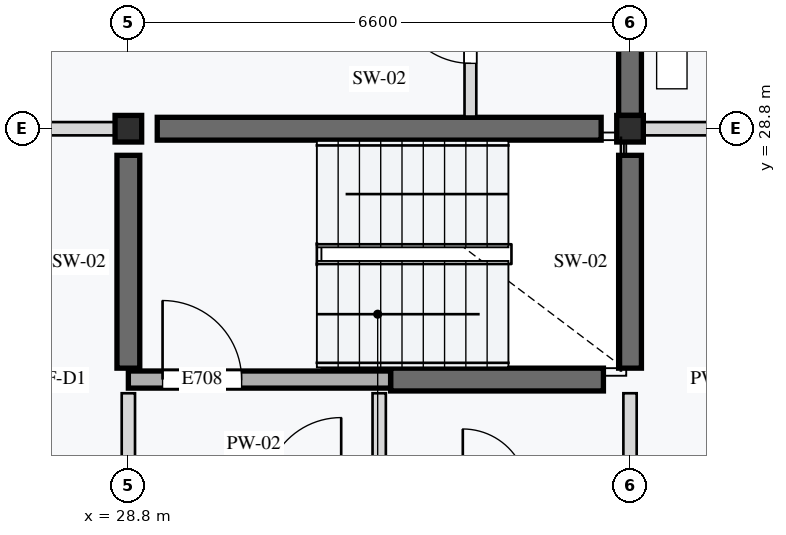
"""IFC4 building model, lengths in metres.
Left out: names, types, materials, properties, quantities, classifications, styles, units other than length and angle.
Written with IfcOpenShell. Run it as: python <this file> out.ifc"""

import sys

from ifc_helpers import new_model, si_unit, direction, frame, frame_2d, origin, origin_2d, place, context, subcontext, project, spatial, rectangle, extrude, element, fill, save


model = new_model("IFC4")
c1 = context("Model", 3, precision=1e-05, world=origin(), true_north=direction((0.0, 1.0)))
c2 = subcontext(c1, "Body", "Model", "MODEL_VIEW")
j1 = project(units=[si_unit("LENGTHUNIT", "METRE"), si_unit("PLANEANGLEUNIT", "RADIAN")], contexts=[c1])
p1 = place(None, origin())
s1 = spatial("IfcSite", under=j1, at=p1, CompositionType="ELEMENT")
p2 = place(p1, origin())
s2 = spatial("IfcBuilding", under=s1, at=p2, CompositionType="ELEMENT")
p3 = place(p2, frame((0.0, 0.0, 24.4)))
s3 = spatial("IfcBuildingStorey", under=s2, at=p3, CompositionType="ELEMENT", Elevation=24.4)
for number, where, z_axis, x_axis in (
    (1, (28.8, 28.8, 0.0), (0.0, 0.0, 1.0), (1.0, 0.0, 0.0)),
    (2, (35.4, 28.8, 0.0), (0.0, 0.0, 1.0), (1.0, 0.0, 0.0)),
):
    element("IfcColumn", number, at=place(p3, frame(where, z_axis=z_axis, x_axis=x_axis)), inside=s3, PredefinedType="COLUMN", context=c2, shape_type="SweptSolid", body=[
        extrude(rectangle(XDim=0.35, YDim=0.35, at=origin_2d()), origin(), (0.0, 0.0, 1.0), 3.2),
    ])
p4 = place(p3, frame((29.18, 28.8, 0.0), z_axis=(0.0, 0.0, 1.0), x_axis=(1.0, 0.0, 0.0)))
e3 = element("IfcWall", 3, at=p4, inside=s3, PredefinedType="SHEAR", context=c2, shape_type="SweptSolid", body=[
    extrude(rectangle(XDim=5.84, YDim=0.3, at=frame_2d((2.92, 0.0))), origin(), (0.0, 0.0, 1.0), 2.97),
])
for number, where, z_axis, x_axis in (
    (4, (32.25, 25.5, 0.0), (0.0, 0.0, 1.0), (1.0, 0.0, 0.0)),
    (5, (28.8, 25.65, 0.0), (0.0, 0.0, 1.0), (0.0, 1.0, 0.0)),
    (6, (35.4, 25.65, 0.0), (0.0, 0.0, 1.0), (0.0, 1.0, 0.0)),
):
    element("IfcWall", number, at=place(p3, frame(where, z_axis=z_axis, x_axis=x_axis)), inside=s3, PredefinedType="SHEAR", context=c2, shape_type="SweptSolid", body=[
        extrude(rectangle(XDim=2.8, YDim=0.3, at=frame_2d((1.4, 0.0))), origin(), (0.0, 0.0, 1.0), 2.97),
    ])
p5 = place(p3, frame((35.4, 28.975, 0.0), z_axis=(0.0, 0.0, 1.0), x_axis=(0.0, 1.0, 0.0)))
e7 = element("IfcWall", 7, at=p5, inside=s3, PredefinedType="SHEAR", context=c2, shape_type="SweptSolid", body=[
    extrude(rectangle(XDim=6.25, YDim=0.3, at=frame_2d((3.125, 0.0))), origin(), (0.0, 0.0, 1.0), 2.97),
])
p6 = place(p3, frame((28.8, 25.5, 0.0), z_axis=(0.0, 0.0, 1.0), x_axis=(1.0, 0.0, 0.0)))
e8 = element("IfcWall", 8, at=p6, inside=s3, PredefinedType="STANDARD", context=c2, shape_type="SweptSolid", body=[
    extrude(rectangle(XDim=3.45, YDim=0.225, at=frame_2d((1.725, 0.0))), origin(), (0.0, 0.0, 1.0), 2.935),
])
p7 = place(p6, frame((0.45, 0.0, 0.0)))
e9 = element("IfcOpeningElement", 9, at=p7, cuts=e8, PredefinedType="OPENING", context=c2, shape_type="SweptSolid", body=[
    extrude(rectangle(XDim=1.04, YDim=2.12, at=frame_2d((0.52, 1.06))), frame((0.0, 0.123, 0.0), z_axis=(0.0, -1.0, 0.0), x_axis=(1.0, 0.0, 0.0)), (0.0, 0.0, 1.0), 0.245),
])
for number, where, z_axis, x_axis in (
    (10, (28.8, 24.18, 0.0), (0.0, 0.0, 1.0), (0.0, 1.0, 0.0)),
    (11, (32.1, 24.18, 0.0), (0.0, 0.0, 1.0), (0.0, 1.0, 0.0)),
    (12, (35.4, 24.18, 0.0), (0.0, 0.0, 1.0), (0.0, 1.0, 0.0)),
):
    element("IfcWall", number, at=place(p3, frame(where, z_axis=z_axis, x_axis=x_axis)), inside=s3, PredefinedType="PARTITIONING", context=c2, shape_type="SweptSolid", body=[
        extrude(rectangle(XDim=1.14, YDim=0.175, at=frame_2d((0.57, 0.0))), origin(), (0.0, 0.0, 1.0), 2.935),
    ])
p8 = place(p3, frame((22.2, 28.8, 0.0), z_axis=(0.0, 0.0, 1.0), x_axis=(1.0, 0.0, 0.0)))
e13 = element("IfcWall", 13, at=p8, inside=s3, PredefinedType="PARTITIONING", context=c2, shape_type="SweptSolid", body=[
    extrude(rectangle(XDim=6.6, YDim=0.175, at=frame_2d((3.3, 0.0))), origin(), (0.0, 0.0, 1.0), 2.7),
])
p9 = place(p8, frame((3.85, 0.0, 0.0)))
e14 = element("IfcOpeningElement", 14, at=p9, cuts=e13, PredefinedType="OPENING", context=c2, shape_type="SweptSolid", body=[
    extrude(rectangle(XDim=0.95, YDim=2.1, at=frame_2d((0.475, 1.05))), frame((0.0, 0.097, 0.0), z_axis=(0.0, -1.0, 0.0), x_axis=(1.0, 0.0, 0.0)), (0.0, 0.0, 1.0), 0.195),
])
p10 = place(p3, frame((33.3, 28.96, 0.0), z_axis=(0.0, 0.0, 1.0), x_axis=(0.0, 1.0, 0.0)))
e15 = element("IfcWall", 15, at=p10, inside=s3, PredefinedType="PARTITIONING", context=c2, shape_type="SweptSolid", body=[
    extrude(rectangle(XDim=2.24, YDim=0.155, at=frame_2d((1.12, 0.0))), origin(), (0.0, 0.0, 1.0), 2.935),
])
p11 = place(p10, frame((0.7, 0.0, 0.0)))
e16 = element("IfcOpeningElement", 16, at=p11, cuts=e15, PredefinedType="OPENING", context=c2, shape_type="SweptSolid", body=[
    extrude(rectangle(XDim=0.98, YDim=2.12, at=frame_2d((0.49, 1.06))), frame((0.0, 0.087, 0.0), z_axis=(0.0, -1.0, 0.0), x_axis=(1.0, 0.0, 0.0)), (0.0, 0.0, 1.0), 0.175),
])
p12 = place(p3, frame((35.4, 28.8, 0.0), z_axis=(0.0, 0.0, 1.0), x_axis=(1.0, 0.0, 0.0)))
e17 = element("IfcWall", 17, at=p12, inside=s3, PredefinedType="PARTITIONING", context=c2, shape_type="SweptSolid", body=[
    extrude(rectangle(XDim=6.6, YDim=0.175, at=frame_2d((3.3, 0.0))), origin(), (0.0, 0.0, 1.0), 2.7),
])
p13 = place(p12, frame((2.725, 0.0, 0.0)))
e18 = element("IfcOpeningElement", 18, at=p13, cuts=e17, PredefinedType="OPENING", context=c2, shape_type="SweptSolid", body=[
    extrude(rectangle(XDim=0.95, YDim=2.16, at=frame_2d((0.475, 1.08))), frame((0.0, 0.097, 0.0), z_axis=(0.0, -1.0, 0.0), x_axis=(1.0, 0.0, 0.0)), (0.0, 0.0, 1.0), 0.195),
])
p14 = place(p7, origin())
e19 = element("IfcDoor", 19, at=p14, inside=s3, OperationType="SINGLE_SWING_LEFT", PredefinedType="DOOR", context=c2, shape_type="SweptSolid", body=[
    extrude(rectangle(XDim=1.04, YDim=2.12, at=frame_2d((0.52, 1.06))), frame((0.0, 0.025, 0.0), z_axis=(0.0, -1.0, 0.0), x_axis=(1.0, 0.0, 0.0)), (0.0, 0.0, 1.0), 0.05),
])
fill(e9, e19)
p15 = place(p11, origin())
e20 = element("IfcDoor", 20, at=p15, inside=s3, OperationType="SINGLE_SWING_RIGHT", PredefinedType="DOOR", context=c2, shape_type="SweptSolid", body=[
    extrude(rectangle(XDim=0.98, YDim=2.12, at=frame_2d((0.49, 1.06))), frame((0.0, 0.025, 0.0), z_axis=(0.0, -1.0, 0.0), x_axis=(1.0, 0.0, 0.0)), (0.0, 0.0, 1.0), 0.05),
])
fill(e16, e20)
save(model, sys.argv[1])
